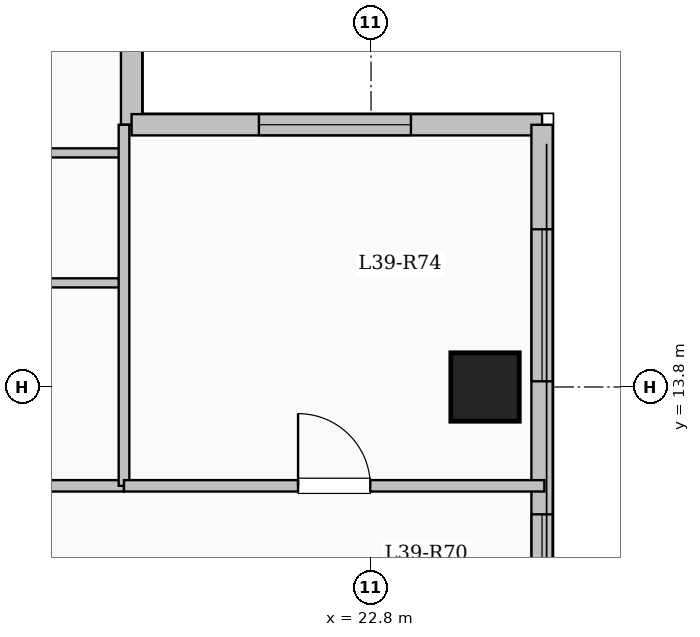
"""IFC4 building model, lengths in metres.
Left out: names, types, materials, properties, quantities, classifications, styles, units other than length and angle.
Written with IfcOpenShell. Run it as: python <this file> out.ifc"""

import sys

from ifc_helpers import new_model, si_unit, direction, frame, frame_2d, origin, origin_2d, place, context, subcontext, project, spatial, rectangle, extrude, element, fill, save


model = new_model("IFC4")
c1 = context("Model", 3, precision=1e-05, world=origin(), true_north=direction((0.0, 1.0)))
c2 = subcontext(c1, "Body", "Model", "MODEL_VIEW")
j1 = project(units=[si_unit("LENGTHUNIT", "METRE"), si_unit("PLANEANGLEUNIT", "RADIAN")], contexts=[c1])
p1 = place(None, origin())
s1 = spatial("IfcSite", under=j1, at=p1, CompositionType="ELEMENT")
p2 = place(p1, origin())
s2 = spatial("IfcBuilding", under=s1, at=p2, CompositionType="ELEMENT")
p3 = place(p2, frame((0.0, 0.0, 146.0)))
s3 = spatial("IfcBuildingStorey", under=s2, at=p3, CompositionType="ELEMENT", Elevation=146.0)
p4 = place(p3, frame((24.3, 13.8, 0.0), z_axis=(0.0, 0.0, 1.0), x_axis=(1.0, 0.0, 0.0)))
e1 = element("IfcColumn", 1, at=p4, inside=s3, PredefinedType="COLUMN", context=c2, shape_type="SweptSolid", body=[
    extrude(rectangle(XDim=0.9, YDim=0.9, at=origin_2d()), origin(), (0.0, 0.0, 1.0), 3.35),
])
p5 = place(p3, frame((19.65, 21.15, 0.0), z_axis=(0.0, 0.0, 1.0), x_axis=(0.0, -1.0, 0.0)))
e2 = element("IfcWall", 2, at=p5, inside=s3, PredefinedType="SOLIDWALL", context=c2, shape_type="SweptSolid", body=[
    extrude(rectangle(XDim=3.9, YDim=0.28, at=frame_2d((1.95, 0.0))), origin(), (0.0, 0.0, 1.0), 3.1),
])
p6 = place(p5, frame((1.143, 0.0, 0.9)))
e3 = element("IfcOpeningElement", 3, at=p6, cuts=e2, PredefinedType="OPENING", context=c2, shape_type="SweptSolid", body=[
    extrude(rectangle(XDim=1.65, YDim=1.6, at=frame_2d((0.825, 0.8))), frame((0.0, 0.15, 0.0), z_axis=(0.0, -1.0, 0.0), x_axis=(1.0, 0.0, 0.0)), (0.0, 0.0, 1.0), 0.3),
])
p7 = place(p3, frame((19.65, 17.25, 0.0), z_axis=(0.0, 0.0, 1.0), x_axis=(1.0, 0.0, 0.0)))
e4 = element("IfcWall", 4, at=p7, inside=s3, PredefinedType="SOLIDWALL", context=c2, shape_type="SweptSolid", body=[
    extrude(rectangle(XDim=5.4, YDim=0.28, at=frame_2d((2.7, 0.0))), origin(), (0.0, 0.0, 1.0), 3.1),
])
p8 = place(p7, frame((1.675, 0.0, 0.9)))
e5 = element("IfcOpeningElement", 5, at=p8, cuts=e4, PredefinedType="OPENING", context=c2, shape_type="SweptSolid", body=[
    extrude(rectangle(XDim=2.0, YDim=1.7, at=frame_2d((1.0, 0.85))), frame((0.0, 0.15, 0.0), z_axis=(0.0, -1.0, 0.0), x_axis=(1.0, 0.0, 0.0)), (0.0, 0.0, 1.0), 0.3),
])
p9 = place(p3, frame((25.05, 17.25, 0.0), z_axis=(0.0, 0.0, 1.0), x_axis=(0.0, -1.0, 0.0)))
e6 = element("IfcWall", 6, at=p9, inside=s3, PredefinedType="SOLIDWALL", context=c2, shape_type="SweptSolid", body=[
    extrude(rectangle(XDim=34.5, YDim=0.28, at=frame_2d((17.25, 0.0))), origin(), (0.0, 0.0, 1.0), 3.1),
])
p10 = place(p9, frame((1.375, 0.0, 0.9)))
e7 = element("IfcOpeningElement", 7, at=p10, cuts=e6, PredefinedType="OPENING", context=c2, shape_type="SweptSolid", body=[
    extrude(rectangle(XDim=2.0, YDim=1.7, at=frame_2d((1.0, 0.85))), frame((0.0, 0.15, 0.0), z_axis=(0.0, -1.0, 0.0), x_axis=(1.0, 0.0, 0.0)), (0.0, 0.0, 1.0), 0.3),
])
p11 = place(p9, frame((5.125, 0.0, 0.95)))
e8 = element("IfcOpeningElement", 8, at=p11, cuts=e6, PredefinedType="OPENING", context=c2, shape_type="SweptSolid", body=[
    extrude(rectangle(XDim=1.0, YDim=1.5, at=frame_2d((0.5, 0.75))), frame((0.0, 0.15, 0.0), z_axis=(0.0, -1.0, 0.0), x_axis=(1.0, 0.0, 0.0)), (0.0, 0.0, 1.0), 0.3),
])
p12 = place(p9, frame((14.5, 0.0, 0.9)))
e9 = element("IfcOpeningElement", 9, at=p12, cuts=e6, PredefinedType="OPENING", context=c2, shape_type="SweptSolid", body=[
    extrude(rectangle(XDim=2.0, YDim=1.7, at=frame_2d((1.0, 0.85))), frame((0.0, 0.15, 0.0), z_axis=(0.0, -1.0, 0.0), x_axis=(1.0, 0.0, 0.0)), (0.0, 0.0, 1.0), 0.3),
])
p13 = place(p9, frame((25.258, 0.0, 0.9)))
e10 = element("IfcOpeningElement", 10, at=p13, cuts=e6, PredefinedType="OPENING", context=c2, shape_type="SweptSolid", body=[
    extrude(rectangle(XDim=1.5, YDim=1.65, at=frame_2d((0.75, 0.825))), frame((0.0, 0.15, 0.0), z_axis=(0.0, -1.0, 0.0), x_axis=(1.0, 0.0, 0.0)), (0.0, 0.0, 1.0), 0.3),
])
p14 = place(p9, frame((29.95, 0.0, 0.9)))
e11 = element("IfcOpeningElement", 11, at=p14, cuts=e6, PredefinedType="OPENING", context=c2, shape_type="SweptSolid", body=[
    extrude(rectangle(XDim=2.2, YDim=1.75, at=frame_2d((1.1, 0.875))), frame((0.0, 0.15, 0.0), z_axis=(0.0, -1.0, 0.0), x_axis=(1.0, 0.0, 0.0)), (0.0, 0.0, 1.0), 0.3),
])
p15 = place(p3, frame((3.85, 12.5, 0.0), z_axis=(0.0, 0.0, 1.0), x_axis=(1.0, 0.0, 0.0)))
e12 = element("IfcWall", 12, at=p15, inside=s3, PredefinedType="PARTITIONING", context=c2, shape_type="SweptSolid", body=[
    extrude(rectangle(XDim=15.7, YDim=0.15, at=frame_2d((7.85, 0.0))), origin(), (0.0, 0.0, 1.0), 3.1),
])
p16 = place(p15, frame((0.7, 0.0, 0.0)))
e13 = element("IfcOpeningElement", 13, at=p16, cuts=e12, PredefinedType="OPENING", context=c2, shape_type="SweptSolid", body=[
    extrude(rectangle(XDim=0.96, YDim=2.15, at=frame_2d((0.48, 1.075))), frame((0.0, 0.085, 0.0), z_axis=(0.0, -1.0, 0.0), x_axis=(1.0, 0.0, 0.0)), (0.0, 0.0, 1.0), 0.17),
])
p17 = place(p3, frame((14.132, 15.17, 0.0), z_axis=(0.0, 0.0, 1.0), x_axis=(1.0, 0.0, 0.0)))
e14 = element("IfcWall", 14, at=p17, inside=s3, PredefinedType="PARTITIONING", context=c2, shape_type="SweptSolid", body=[
    extrude(rectangle(XDim=5.418, YDim=0.12, at=frame_2d((2.709, 0.0))), origin(), (0.0, 0.0, 1.0), 3.1),
])
p18 = place(p17, frame((2.269, 0.0, 0.0)))
e15 = element("IfcOpeningElement", 15, at=p18, cuts=e14, PredefinedType="OPENING", context=c2, shape_type="SweptSolid", body=[
    extrude(rectangle(XDim=0.88, YDim=2.1, at=frame_2d((0.44, 1.05))), frame((0.0, 0.07, 0.0), z_axis=(0.0, -1.0, 0.0), x_axis=(1.0, 0.0, 0.0)), (0.0, 0.0, 1.0), 0.14),
])
p19 = place(p3, frame((6.969, 16.88, 0.0), z_axis=(0.0, 0.0, 1.0), x_axis=(1.0, 0.0, 0.0)))
e16 = element("IfcWall", 16, at=p19, inside=s3, PredefinedType="PARTITIONING", context=c2, shape_type="SweptSolid", body=[
    extrude(rectangle(XDim=12.641, YDim=0.12, at=frame_2d((6.321, 0.0))), origin(), (0.0, 0.0, 1.0), 2.685),
])
p20 = place(p19, frame((1.637, 0.0, 0.0)))
e17 = element("IfcOpeningElement", 17, at=p20, cuts=e16, PredefinedType="OPENING", context=c2, shape_type="SweptSolid", body=[
    extrude(rectangle(XDim=0.88, YDim=2.1, at=frame_2d((0.44, 1.05))), frame((0.0, 0.07, 0.0), z_axis=(0.0, -1.0, 0.0), x_axis=(1.0, 0.0, 0.0)), (0.0, 0.0, 1.0), 0.14),
])
p21 = place(p19, frame((5.791, 0.0, 0.0)))
e18 = element("IfcOpeningElement", 18, at=p21, cuts=e16, PredefinedType="OPENING", context=c2, shape_type="SweptSolid", body=[
    extrude(rectangle(XDim=0.88, YDim=2.1, at=frame_2d((0.44, 1.05))), frame((0.0, 0.07, 0.0), z_axis=(0.0, -1.0, 0.0), x_axis=(1.0, 0.0, 0.0)), (0.0, 0.0, 1.0), 0.14),
])
p22 = place(p19, frame((9.944, 0.0, 0.0)))
e19 = element("IfcOpeningElement", 19, at=p22, cuts=e16, PredefinedType="OPENING", context=c2, shape_type="SweptSolid", body=[
    extrude(rectangle(XDim=0.88, YDim=2.1, at=frame_2d((0.44, 1.05))), frame((0.0, 0.07, 0.0), z_axis=(0.0, -1.0, 0.0), x_axis=(1.0, 0.0, 0.0)), (0.0, 0.0, 1.0), 0.14),
])
p23 = place(p3, frame((19.55, 12.5, 0.0), z_axis=(0.0, 0.0, 1.0), x_axis=(0.0, 1.0, 0.0)))
e20 = element("IfcWall", 20, at=p23, inside=s3, PredefinedType="PARTITIONING", context=c2, shape_type="SweptSolid", body=[
    extrude(rectangle(XDim=4.75, YDim=0.14, at=frame_2d((2.375, 0.0))), origin(), (0.0, 0.0, 1.0), 3.1),
])
p24 = place(p3, frame((19.55, 12.5, 0.0), z_axis=(0.0, 0.0, 1.0), x_axis=(1.0, 0.0, 0.0)))
e21 = element("IfcWall", 21, at=p24, inside=s3, PredefinedType="PARTITIONING", context=c2, shape_type="SweptSolid", body=[
    extrude(rectangle(XDim=5.53, YDim=0.15, at=frame_2d((2.765, 0.0))), origin(), (0.0, 0.0, 1.0), 3.1),
])
p25 = place(p24, frame((2.29, 0.0, 0.0)))
e22 = element("IfcOpeningElement", 22, at=p25, cuts=e21, PredefinedType="OPENING", context=c2, shape_type="SweptSolid", body=[
    extrude(rectangle(XDim=0.95, YDim=2.15, at=frame_2d((0.475, 1.075))), frame((0.0, 0.085, 0.0), z_axis=(0.0, -1.0, 0.0), x_axis=(1.0, 0.0, 0.0)), (0.0, 0.0, 1.0), 0.17),
])
p26 = place(p8, origin())
e23 = element("IfcWindow", 23, at=p26, inside=s3, PartitioningType="SINGLE_PANEL", PredefinedType="WINDOW", context=c2, shape_type="SweptSolid", body=[
    extrude(rectangle(XDim=2.0, YDim=1.7, at=frame_2d((1.0, 0.85))), frame((0.0, 0.03, 0.0), z_axis=(0.0, -1.0, 0.0), x_axis=(1.0, 0.0, 0.0)), (0.0, 0.0, 1.0), 0.06),
])
fill(e5, e23)
p27 = place(p10, origin())
e24 = element("IfcWindow", 24, at=p27, inside=s3, PartitioningType="SINGLE_PANEL", PredefinedType="WINDOW", context=c2, shape_type="SweptSolid", body=[
    extrude(rectangle(XDim=2.0, YDim=1.7, at=frame_2d((1.0, 0.85))), frame((0.0, 0.03, 0.0), z_axis=(0.0, -1.0, 0.0), x_axis=(1.0, 0.0, 0.0)), (0.0, 0.0, 1.0), 0.06),
])
fill(e7, e24)
p28 = place(p11, origin())
e25 = element("IfcWindow", 25, at=p28, inside=s3, PartitioningType="SINGLE_PANEL", PredefinedType="WINDOW", context=c2, shape_type="SweptSolid", body=[
    extrude(rectangle(XDim=1.0, YDim=1.5, at=frame_2d((0.5, 0.75))), frame((0.0, 0.03, 0.0), z_axis=(0.0, -1.0, 0.0), x_axis=(1.0, 0.0, 0.0)), (0.0, 0.0, 1.0), 0.06),
])
fill(e8, e25)
p29 = place(p25, origin())
e26 = element("IfcDoor", 26, at=p29, inside=s3, OperationType="SINGLE_SWING_LEFT", PredefinedType="DOOR", context=c2, shape_type="SweptSolid", body=[
    extrude(rectangle(XDim=0.95, YDim=2.15, at=frame_2d((0.475, 1.075))), frame((0.0, 0.025, 0.0), z_axis=(0.0, -1.0, 0.0), x_axis=(1.0, 0.0, 0.0)), (0.0, 0.0, 1.0), 0.05),
])
fill(e22, e26)
save(model, sys.argv[1])
